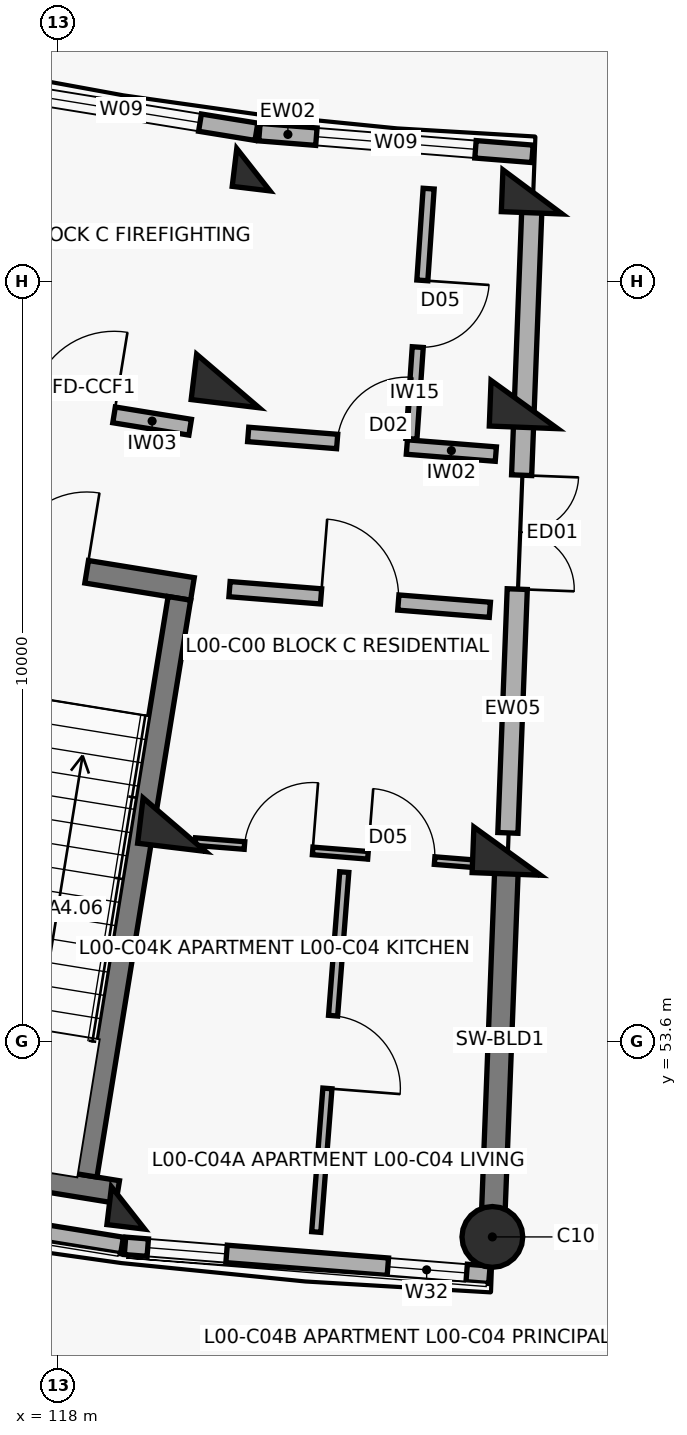
"""IFC4 building model, lengths in metres.
Left out: names, types, materials, properties, quantities, classifications, styles, units other than length and angle.
Written with IfcOpenShell. Run it as: python <this file> out.ifc"""

import sys

from ifc_helpers import new_model, si_unit, direction, frame, frame_2d, origin, origin_2d, place, context, subcontext, project, spatial, rectangle, circle, extrude, element, fill, save


model = new_model("IFC4")
c1 = context("Model", 3, precision=1e-05, world=origin(), true_north=direction((0.0, 1.0)))
c2 = subcontext(c1, "Body", "Model", "MODEL_VIEW")
j1 = project(units=[si_unit("LENGTHUNIT", "METRE"), si_unit("PLANEANGLEUNIT", "RADIAN")], contexts=[c1])
p1 = place(None, origin())
s1 = spatial("IfcSite", under=j1, at=p1, CompositionType="ELEMENT")
p2 = place(p1, origin())
s2 = spatial("IfcBuilding", under=s1, at=p2, CompositionType="ELEMENT")
p3 = place(p2, origin())
s3 = spatial("IfcBuildingStorey", under=s2, at=p3, CompositionType="ELEMENT", Elevation=0.0)
p4 = place(p3, frame((120.575, 65.065, 0.0), z_axis=(0.0, 0.0, 1.0), x_axis=(-0.119790293837, -0.992799217114, 0.0)))
e1 = element("IfcColumn", 1, at=p4, inside=s3, PredefinedType="COLUMN", context=c2, shape_type="SweptSolid", body=[
    extrude(rectangle(XDim=0.5, YDim=0.5, at=origin_2d()), origin(), (0.0, 0.0, 1.0), 4.5),
])
for number, where, z_axis, x_axis in (
    (2, (120.24, 62.285, 0.0), (0.0, 0.0, 1.0), (-0.12, -0.993, 0.0)),
    (3, (119.535, 56.448, 0.0), (0.0, 0.0, 1.0), (-0.12, -0.993, 0.0)),
):
    element("IfcColumn", number, at=place(p3, frame(where, z_axis=z_axis, x_axis=x_axis)), inside=s3, PredefinedType="COLUMN", context=c2, shape_type="SweptSolid", body=[
        extrude(rectangle(XDim=0.6, YDim=0.9, at=origin_2d()), origin(), (0.0, 0.0, 1.0), 4.5),
    ])
p5 = place(p3, frame((118.927, 51.404, 0.0), z_axis=(0.0, 0.0, 1.0), x_axis=(-0.119790293837, -0.992799217114, 0.0)))
e4 = element("IfcColumn", 4, at=p5, inside=s3, PredefinedType="COLUMN", context=c2, shape_type="SweptSolid", body=[
    extrude(rectangle(XDim=0.5, YDim=0.5, at=origin_2d()), origin(), (0.0, 0.0, 1.0), 4.5),
])
p6 = place(p3, frame((124.248, 64.773, 0.0), z_axis=(0.0, 0.0, 1.0), x_axis=(-0.038387809088, -0.999262916411, 0.0)))
e5 = element("IfcColumn", 5, at=p6, inside=s3, PredefinedType="COLUMN", context=c2, shape_type="SweptSolid", body=[
    extrude(rectangle(XDim=0.55, YDim=0.8, at=origin_2d()), origin(), (0.0, 0.0, 1.0), 4.5),
])
for number, where, z_axis, x_axis in (
    (6, (124.14, 61.975, 0.0), (0.0, 0.0, 1.0), (-0.038, -0.999, 0.0)),
    (7, (123.915, 56.1, 0.0), (0.0, 0.0, 1.0), (-0.038, -0.999, 0.0)),
):
    element("IfcColumn", number, at=place(p3, frame(where, z_axis=z_axis, x_axis=x_axis)), inside=s3, PredefinedType="COLUMN", context=c2, shape_type="SweptSolid", body=[
        extrude(rectangle(XDim=0.6, YDim=0.9, at=origin_2d()), origin(), (0.0, 0.0, 1.0), 4.5),
    ])
p7 = place(p3, frame((123.72, 51.023, 0.0), z_axis=(0.0, 0.0, 1.0), x_axis=(-0.038387809088, -0.999262916411, 0.0)))
e8 = element("IfcColumn", 8, at=p7, inside=s3, PredefinedType="COLUMN", context=c2, shape_type="SweptSolid", body=[
    extrude(circle(Radius=0.4, at=origin_2d()), origin(), (0.0, 0.0, 1.0), 4.5),
])
p8 = place(p3, frame((123.908, 55.92, 0.0), z_axis=(0.0, 0.0, 1.0), x_axis=(-0.038381471406, -0.99926315986, 0.0)))
e9 = element("IfcWall", 9, at=p8, inside=s3, PredefinedType="SHEAR", context=c2, shape_type="SweptSolid", body=[
    extrude(rectangle(XDim=4.72, YDim=0.31, at=frame_2d((2.36, 0.0))), origin(), (0.0, 0.0, 1.0), 4.26),
])
p9 = place(p3, frame((114.1, 51.681, 0.0), z_axis=(0.0, 0.0, 1.0), x_axis=(0.987080750493, -0.160223568819, 0.0)))
e10 = element("IfcWall", 10, at=p9, inside=s3, PredefinedType="SOLIDWALL", context=c2, shape_type="SweptSolid", body=[
    extrude(rectangle(XDim=4.809, YDim=0.22, at=frame_2d((2.404, 0.0))), origin(), (0.0, 0.0, 1.0), 3.45),
])
p10 = place(p3, frame((117.058, 66.142, 0.0), z_axis=(0.0, 0.0, 1.0), x_axis=(0.987080874485, -0.160222804952, 0.0)))
e11 = element("IfcWall", 11, at=p10, inside=s3, PredefinedType="SOLIDWALL", context=c2, shape_type="SweptSolid", body=[
    extrude(rectangle(XDim=3.604, YDim=0.23, at=frame_2d((1.802, 0.0))), origin(), (0.0, 0.0, 1.0), 3.45),
])
p11 = place(p10, frame((0.752, 0.0, 0.32)))
e12 = element("IfcOpeningElement", 12, at=p11, cuts=e11, PredefinedType="OPENING", context=c2, shape_type="SweptSolid", body=[
    extrude(rectangle(XDim=2.1, YDim=1.65, at=frame_2d((1.05, 0.825))), frame((0.0, 0.125, 0.0), z_axis=(0.0, -1.0, 0.0), x_axis=(1.0, 0.0, 0.0)), (0.0, 0.0, 1.0), 0.25),
])
p12 = place(p3, frame((118.887, 50.906, 0.0), z_axis=(0.0, 0.0, 1.0), x_axis=(0.99686304063, -0.079145929942, 0.0)))
e13 = element("IfcWall", 13, at=p12, inside=s3, PredefinedType="SOLIDWALL", context=c2, shape_type="SweptSolid", body=[
    extrude(rectangle(XDim=4.809, YDim=0.23, at=frame_2d((2.405, 0.0))), origin(), (0.0, 0.0, 1.0), 3.45),
])
p13 = place(p12, frame((0.3, 0.0, 0.3)))
e14 = element("IfcOpeningElement", 14, at=p13, cuts=e13, PredefinedType="OPENING", context=c2, shape_type="SweptSolid", body=[
    extrude(rectangle(XDim=1.04, YDim=1.56, at=frame_2d((0.52, 0.78))), frame((0.0, 0.125, 0.0), z_axis=(0.0, -1.0, 0.0), x_axis=(1.0, 0.0, 0.0)), (0.0, 0.0, 1.0), 0.25),
])
p14 = place(p12, frame((3.469, 0.0, 0.3)))
e15 = element("IfcOpeningElement", 15, at=p14, cuts=e13, PredefinedType="OPENING", context=c2, shape_type="SweptSolid", body=[
    extrude(rectangle(XDim=1.04, YDim=1.56, at=frame_2d((0.52, 0.78))), frame((0.0, 0.125, 0.0), z_axis=(0.0, -1.0, 0.0), x_axis=(1.0, 0.0, 0.0)), (0.0, 0.0, 1.0), 0.25),
])
p15 = place(p3, frame((120.655, 65.56, 0.0), z_axis=(0.0, 0.0, 1.0), x_axis=(0.996859283449, -0.079193238352, 0.0)))
e16 = element("IfcWall", 16, at=p15, inside=s3, PredefinedType="SOLIDWALL", context=c2, shape_type="SweptSolid", body=[
    extrude(rectangle(XDim=3.604, YDim=0.23, at=frame_2d((1.802, 0.0))), origin(), (0.0, 0.0, 1.0), 3.45),
])
p16 = place(p15, frame((0.752, 0.0, 0.32)))
e17 = element("IfcOpeningElement", 17, at=p16, cuts=e16, PredefinedType="OPENING", context=c2, shape_type="SweptSolid", body=[
    extrude(rectangle(XDim=2.1, YDim=1.65, at=frame_2d((1.05, 0.825))), frame((0.0, 0.125, 0.0), z_axis=(0.0, -1.0, 0.0), x_axis=(1.0, 0.0, 0.0)), (0.0, 0.0, 1.0), 0.25),
])
p17 = place(p3, frame((124.239, 64.533, 0.0), z_axis=(0.0, 0.0, 1.0), x_axis=(-0.038407966241, -0.999262141847, 0.0)))
e18 = element("IfcWall", 18, at=p17, inside=s3, PredefinedType="SOLIDWALL", context=c2, shape_type="SweptSolid", body=[
    extrude(rectangle(XDim=8.2, YDim=0.265, at=frame_2d((4.1, 0.0))), origin(), (0.0, 0.0, 1.0), 3.34),
])
p18 = place(p17, frame((3.49, 0.0, 0.0)))
e19 = element("IfcOpeningElement", 19, at=p18, cuts=e18, PredefinedType="OPENING", context=c2, shape_type="SweptSolid", body=[
    extrude(rectangle(XDim=1.5, YDim=2.2, at=frame_2d((0.75, 1.1))), frame((0.0, 0.142, 0.0), z_axis=(0.0, -1.0, 0.0), x_axis=(1.0, 0.0, 0.0)), (0.0, 0.0, 1.0), 0.285),
])
p19 = place(p3, frame((115.954, 60.169, 0.0), z_axis=(0.0, 0.0, 1.0), x_axis=(0.987077443397, -0.160243941341, 0.0)))
e20 = element("IfcWall", 20, at=p19, inside=s3, PredefinedType="SHEAR", context=c2, shape_type="SweptSolid", body=[
    extrude(rectangle(XDim=3.87, YDim=0.3, at=frame_2d((1.935, 0.0))), origin(), (0.0, 0.0, 1.0), 4.5),
])
p20 = place(p19, frame((1.41, 0.0, 0.0)))
e21 = element("IfcOpeningElement", 21, at=p20, cuts=e20, PredefinedType="OPENING", context=c2, shape_type="SweptSolid", body=[
    extrude(rectangle(XDim=1.05, YDim=2.15, at=frame_2d((0.525, 1.075))), frame((0.0, 0.16, 0.0), z_axis=(0.0, -1.0, 0.0), x_axis=(1.0, 0.0, 0.0)), (0.0, 0.0, 1.0), 0.32),
])
p21 = place(p3, frame((114.377, 52.331, 0.0), z_axis=(0.0, 0.0, 1.0), x_axis=(0.987077474317, -0.16024375088, 0.0)))
e22 = element("IfcWall", 22, at=p21, inside=s3, PredefinedType="SHEAR", context=c2, shape_type="SweptSolid", body=[
    extrude(rectangle(XDim=4.47, YDim=0.3, at=frame_2d((2.235, 0.0))), origin(), (0.0, 0.0, 1.0), 4.5),
])
p22 = place(p3, frame((119.602, 59.425, 0.0), z_axis=(0.0, 0.0, 1.0), x_axis=(-0.160201584773, -0.987084318706, 0.0)))
e23 = element("IfcWall", 23, at=p22, inside=s3, PredefinedType="SHEAR", context=c2, shape_type="SweptSolid", body=[
    extrude(rectangle(XDim=7.69, YDim=0.3, at=frame_2d((3.845, 0.0))), origin(), (0.0, 0.0, 1.0), 4.5),
])
p23 = place(p3, frame((116.656, 62.178, 0.0), z_axis=(0.0, 0.0, 1.0), x_axis=(0.987083140276, -0.16020884552, 0.0)))
e24 = element("IfcWall", 24, at=p23, inside=s3, PredefinedType="SOLIDWALL", context=c2, shape_type="SweptSolid", body=[
    extrude(rectangle(XDim=3.129, YDim=0.21, at=frame_2d((1.564, 0.0))), origin(), (0.0, 0.0, 1.0), 3.34),
])
p24 = place(p23, frame((1.014, 0.0, 0.0)))
e25 = element("IfcOpeningElement", 25, at=p24, cuts=e24, PredefinedType="OPENING", context=c2, shape_type="SweptSolid", body=[
    extrude(rectangle(XDim=1.1, YDim=2.15, at=frame_2d((0.55, 1.075))), frame((0.0, 0.115, 0.0), z_axis=(0.0, -1.0, 0.0), x_axis=(1.0, 0.0, 0.0)), (0.0, 0.0, 1.0), 0.23),
])
p25 = place(p3, frame((120.261, 59.547, 0.0), z_axis=(0.0, 0.0, 1.0), x_axis=(0.996862545573, -0.079152165058, 0.0)))
e26 = element("IfcWall", 26, at=p25, inside=s3, PredefinedType="SOLIDWALL", context=c2, shape_type="SweptSolid", body=[
    extrude(rectangle(XDim=3.436, YDim=0.2, at=frame_2d((1.718, 0.0))), origin(), (0.0, 0.0, 1.0), 3.34),
])
p26 = place(p25, frame((1.208, 0.0, 0.0)))
e27 = element("IfcOpeningElement", 27, at=p26, cuts=e26, PredefinedType="OPENING", context=c2, shape_type="SweptSolid", body=[
    extrude(rectangle(XDim=1.02, YDim=2.15, at=frame_2d((0.51, 1.075))), frame((0.0, 0.11, 0.0), z_axis=(0.0, -1.0, 0.0), x_axis=(1.0, 0.0, 0.0)), (0.0, 0.0, 1.0), 0.22),
])
p27 = place(p3, frame((120.507, 61.582, 0.0), z_axis=(0.0, 0.0, 1.0), x_axis=(0.996860715473, -0.07917521043, 0.0)))
e28 = element("IfcWall", 28, at=p27, inside=s3, PredefinedType="SOLIDWALL", context=c2, shape_type="SweptSolid", body=[
    extrude(rectangle(XDim=3.269, YDim=0.19, at=frame_2d((1.634, 0.0))), origin(), (0.0, 0.0, 1.0), 3.34),
])
p28 = place(p27, frame((1.174, 0.0, 0.0)))
e29 = element("IfcOpeningElement", 29, at=p28, cuts=e28, PredefinedType="OPENING", context=c2, shape_type="SweptSolid", body=[
    extrude(rectangle(XDim=0.92, YDim=2.1, at=frame_2d((0.46, 1.05))), frame((0.0, 0.105, 0.0), z_axis=(0.0, -1.0, 0.0), x_axis=(1.0, 0.0, 0.0)), (0.0, 0.0, 1.0), 0.21),
])
p29 = place(p3, frame((122.881, 64.816, 0.0), z_axis=(0.0, 0.0, 1.0), x_axis=(-0.068581194944, -0.997645538105, 0.0)))
e30 = element("IfcWall", 30, at=p29, inside=s3, PredefinedType="PARTITIONING", context=c2, shape_type="SweptSolid", body=[
    extrude(rectangle(XDim=3.3, YDim=0.145, at=frame_2d((1.65, 0.0))), origin(), (0.0, 0.0, 1.0), 3.34),
])
p30 = place(p29, frame((1.21, 0.0, 0.0)))
e31 = element("IfcOpeningElement", 31, at=p30, cuts=e30, PredefinedType="OPENING", context=c2, shape_type="SweptSolid", body=[
    extrude(rectangle(XDim=0.88, YDim=2.1, at=frame_2d((0.44, 1.05))), frame((0.0, 0.083, 0.0), z_axis=(0.0, -1.0, 0.0), x_axis=(1.0, 0.0, 0.0)), (0.0, 0.0, 1.0), 0.165),
])
p31 = place(p3, frame((119.81, 56.225, 0.0), z_axis=(0.0, 0.0, 1.0), x_axis=(0.996862985267, -0.079146627246, 0.0)))
e32 = element("IfcWall", 32, at=p31, inside=s3, PredefinedType="PARTITIONING", context=c2, shape_type="SweptSolid", body=[
    extrude(rectangle(XDim=3.81, YDim=0.1, at=frame_2d((1.905, 0.0))), origin(), (0.0, 0.0, 1.0), 3.34),
])
p32 = place(p31, frame((0.65, 0.0, 0.0)))
e33 = element("IfcOpeningElement", 33, at=p32, cuts=e32, PredefinedType="OPENING", context=c2, shape_type="SweptSolid", body=[
    extrude(rectangle(XDim=0.9, YDim=2.1, at=frame_2d((0.45, 1.05))), frame((0.0, 0.06, 0.0), z_axis=(0.0, -1.0, 0.0), x_axis=(1.0, 0.0, 0.0)), (0.0, 0.0, 1.0), 0.12),
])
p33 = place(p31, frame((2.28, 0.0, 0.0)))
e34 = element("IfcOpeningElement", 34, at=p33, cuts=e32, PredefinedType="OPENING", context=c2, shape_type="SweptSolid", body=[
    extrude(rectangle(XDim=0.88, YDim=2.1, at=frame_2d((0.44, 1.05))), frame((0.0, 0.06, 0.0), z_axis=(0.0, -1.0, 0.0), x_axis=(1.0, 0.0, 0.0)), (0.0, 0.0, 1.0), 0.12),
])
p34 = place(p3, frame((121.771, 55.824, 0.0), z_axis=(0.0, 0.0, 1.0), x_axis=(-0.077659382624, -0.996979949794, 0.0)))
e35 = element("IfcWall", 35, at=p34, inside=s3, PredefinedType="PARTITIONING", context=c2, shape_type="SweptSolid", body=[
    extrude(rectangle(XDim=4.75, YDim=0.12, at=frame_2d((2.375, 0.0))), origin(), (0.0, 0.0, 1.0), 3.34),
])
p35 = place(p34, frame((1.895, 0.0, 0.0)))
e36 = element("IfcOpeningElement", 36, at=p35, cuts=e35, PredefinedType="OPENING", context=c2, shape_type="SweptSolid", body=[
    extrude(rectangle(XDim=0.96, YDim=2.1, at=frame_2d((0.48, 1.05))), frame((0.0, 0.07, 0.0), z_axis=(0.0, -1.0, 0.0), x_axis=(1.0, 0.0, 0.0)), (0.0, 0.0, 1.0), 0.14),
])
p36 = place(p11, origin())
e37 = element("IfcWindow", 37, at=p36, inside=s3, PartitioningType="TRIPLE_PANEL_VERTICAL", PredefinedType="WINDOW", context=c2, shape_type="SweptSolid", body=[
    extrude(rectangle(XDim=2.1, YDim=1.65, at=frame_2d((1.05, 0.825))), frame((0.0, 0.03, 0.0), z_axis=(0.0, -1.0, 0.0), x_axis=(1.0, 0.0, 0.0)), (0.0, 0.0, 1.0), 0.06),
])
fill(e12, e37)
p37 = place(p13, origin())
e38 = element("IfcWindow", 38, at=p37, inside=s3, PartitioningType="DOUBLE_PANEL_VERTICAL", PredefinedType="WINDOW", context=c2, shape_type="SweptSolid", body=[
    extrude(rectangle(XDim=1.04, YDim=1.56, at=frame_2d((0.52, 0.78))), frame((0.0, 0.03, 0.0), z_axis=(0.0, -1.0, 0.0), x_axis=(1.0, 0.0, 0.0)), (0.0, 0.0, 1.0), 0.06),
])
fill(e14, e38)
p38 = place(p14, origin())
e39 = element("IfcWindow", 39, at=p38, inside=s3, PartitioningType="DOUBLE_PANEL_VERTICAL", PredefinedType="WINDOW", context=c2, shape_type="SweptSolid", body=[
    extrude(rectangle(XDim=1.04, YDim=1.56, at=frame_2d((0.52, 0.78))), frame((0.0, 0.03, 0.0), z_axis=(0.0, -1.0, 0.0), x_axis=(1.0, 0.0, 0.0)), (0.0, 0.0, 1.0), 0.06),
])
fill(e15, e39)
p39 = place(p16, origin())
e40 = element("IfcWindow", 40, at=p39, inside=s3, PartitioningType="TRIPLE_PANEL_VERTICAL", PredefinedType="WINDOW", context=c2, shape_type="SweptSolid", body=[
    extrude(rectangle(XDim=2.1, YDim=1.65, at=frame_2d((1.05, 0.825))), frame((0.0, 0.03, 0.0), z_axis=(0.0, -1.0, 0.0), x_axis=(1.0, 0.0, 0.0)), (0.0, 0.0, 1.0), 0.06),
])
fill(e17, e40)
p40 = place(p18, origin())
e41 = element("IfcDoor", 41, at=p40, inside=s3, OperationType="DOUBLE_DOOR_SINGLE_SWING", PredefinedType="DOOR", context=c2, shape_type="SweptSolid", body=[
    extrude(rectangle(XDim=1.5, YDim=2.2, at=frame_2d((0.75, 1.1))), frame((0.0, 0.025, 0.0), z_axis=(0.0, -1.0, 0.0), x_axis=(1.0, 0.0, 0.0)), (0.0, 0.0, 1.0), 0.05),
])
fill(e19, e41)
p41 = place(p20, origin())
e42 = element("IfcDoor", 42, at=p41, inside=s3, OperationType="SINGLE_SWING_RIGHT", PredefinedType="DOOR", context=c2, shape_type="SweptSolid", body=[
    extrude(rectangle(XDim=1.05, YDim=2.15, at=frame_2d((0.525, 1.075))), frame((0.0, 0.025, 0.0), z_axis=(0.0, -1.0, 0.0), x_axis=(1.0, 0.0, 0.0)), (0.0, 0.0, 1.0), 0.05),
])
fill(e21, e42)
p42 = place(p24, origin())
e43 = element("IfcDoor", 43, at=p42, inside=s3, OperationType="SINGLE_SWING_RIGHT", PredefinedType="DOOR", context=c2, shape_type="SweptSolid", body=[
    extrude(rectangle(XDim=1.1, YDim=2.15, at=frame_2d((0.55, 1.075))), frame((0.0, 0.025, 0.0), z_axis=(0.0, -1.0, 0.0), x_axis=(1.0, 0.0, 0.0)), (0.0, 0.0, 1.0), 0.05),
])
fill(e25, e43)
p43 = place(p26, origin())
e44 = element("IfcDoor", 44, at=p43, inside=s3, OperationType="SINGLE_SWING_LEFT", PredefinedType="DOOR", context=c2, shape_type="SweptSolid", body=[
    extrude(rectangle(XDim=1.02, YDim=2.15, at=frame_2d((0.51, 1.075))), frame((0.0, 0.025, 0.0), z_axis=(0.0, -1.0, 0.0), x_axis=(1.0, 0.0, 0.0)), (0.0, 0.0, 1.0), 0.05),
])
fill(e27, e44)
p44 = place(p28, origin())
e45 = element("IfcDoor", 45, at=p44, inside=s3, OperationType="SINGLE_SWING_RIGHT", PredefinedType="DOOR", context=c2, shape_type="SweptSolid", body=[
    extrude(rectangle(XDim=0.92, YDim=2.1, at=frame_2d((0.46, 1.05))), frame((0.0, 0.025, 0.0), z_axis=(0.0, -1.0, 0.0), x_axis=(1.0, 0.0, 0.0)), (0.0, 0.0, 1.0), 0.05),
])
fill(e29, e45)
p45 = place(p30, origin())
e46 = element("IfcDoor", 46, at=p45, inside=s3, OperationType="SINGLE_SWING_LEFT", PredefinedType="DOOR", context=c2, shape_type="SweptSolid", body=[
    extrude(rectangle(XDim=0.88, YDim=2.1, at=frame_2d((0.44, 1.05))), frame((0.0, 0.025, 0.0), z_axis=(0.0, -1.0, 0.0), x_axis=(1.0, 0.0, 0.0)), (0.0, 0.0, 1.0), 0.05),
])
fill(e31, e46)
p46 = place(p32, origin())
e47 = element("IfcDoor", 47, at=p46, inside=s3, OperationType="SINGLE_SWING_RIGHT", PredefinedType="DOOR", context=c2, shape_type="SweptSolid", body=[
    extrude(rectangle(XDim=0.9, YDim=2.1, at=frame_2d((0.45, 1.05))), frame((0.0, 0.025, 0.0), z_axis=(0.0, -1.0, 0.0), x_axis=(1.0, 0.0, 0.0)), (0.0, 0.0, 1.0), 0.05),
])
fill(e33, e47)
p47 = place(p33, origin())
e48 = element("IfcDoor", 48, at=p47, inside=s3, OperationType="SINGLE_SWING_LEFT", PredefinedType="DOOR", context=c2, shape_type="SweptSolid", body=[
    extrude(rectangle(XDim=0.88, YDim=2.1, at=frame_2d((0.44, 1.05))), frame((0.0, 0.025, 0.0), z_axis=(0.0, -1.0, 0.0), x_axis=(1.0, 0.0, 0.0)), (0.0, 0.0, 1.0), 0.05),
])
fill(e34, e48)
p48 = place(p35, origin())
e49 = element("IfcDoor", 49, at=p48, inside=s3, OperationType="SINGLE_SWING_RIGHT", PredefinedType="DOOR", context=c2, shape_type="SweptSolid", body=[
    extrude(rectangle(XDim=0.96, YDim=2.1, at=frame_2d((0.48, 1.05))), frame((0.0, 0.025, 0.0), z_axis=(0.0, -1.0, 0.0), x_axis=(1.0, 0.0, 0.0)), (0.0, 0.0, 1.0), 0.05),
])
fill(e36, e49)
save(model, sys.argv[1])
